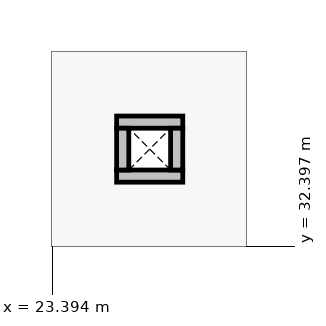
"""IFC4 building model, lengths in metres.
Left out: names, types, materials, properties, quantities, classifications, styles, units other than length and angle.
Written with IfcOpenShell. Run it as: python <this file> out.ifc"""

import sys

from ifc_helpers import new_model, si_unit, direction, frame, frame_2d, origin, place, context, subcontext, project, spatial, rectangle, extrude, element, save


model = new_model("IFC4")
c1 = context("Model", 3, precision=1e-05, world=origin(), true_north=direction((0.0, 1.0)))
c2 = subcontext(c1, "Body", "Model", "MODEL_VIEW")
j1 = project(units=[si_unit("LENGTHUNIT", "METRE"), si_unit("PLANEANGLEUNIT", "RADIAN")], contexts=[c1])
p1 = place(None, origin())
s1 = spatial("IfcSite", under=j1, at=p1, CompositionType="ELEMENT")
p2 = place(p1, origin())
s2 = spatial("IfcBuilding", under=s1, at=p2, CompositionType="ELEMENT")
p3 = place(p2, frame((0.0, 0.0, 4.8)))
s3 = spatial("IfcBuildingStorey", under=s2, at=p3, CompositionType="ELEMENT", Elevation=4.8)
for number, where, z_axis, x_axis in (
    (1, (24.24, 33.32, 0.0), (0.0, 0.0, 1.0), (1.0, 0.0, 0.0)),
    (2, (24.24, 34.03, 0.0), (0.0, 0.0, 1.0), (1.0, 0.0, 0.0)),
):
    element("IfcWall", number, at=place(p3, frame(where, z_axis=z_axis, x_axis=x_axis)), inside=s3, PredefinedType="PARTITIONING", context=c2, shape_type="SweptSolid", body=[
        extrude(rectangle(XDim=0.87, YDim=0.16, at=frame_2d((0.435, 0.0))), origin(), (0.0, 0.0, 1.0), 3.35),
    ])
for number, where, z_axis, x_axis in (
    (3, (24.32, 33.4, 0.0), (0.0, 0.0, 1.0), (0.0, 1.0, 0.0)),
    (4, (25.03, 33.4, 0.0), (0.0, 0.0, 1.0), (0.0, 1.0, 0.0)),
):
    element("IfcWall", number, at=place(p3, frame(where, z_axis=z_axis, x_axis=x_axis)), inside=s3, PredefinedType="PARTITIONING", context=c2, shape_type="SweptSolid", body=[
        extrude(rectangle(XDim=0.55, YDim=0.16, at=frame_2d((0.275, 0.0))), origin(), (0.0, 0.0, 1.0), 3.35),
    ])
save(model, sys.argv[1])
